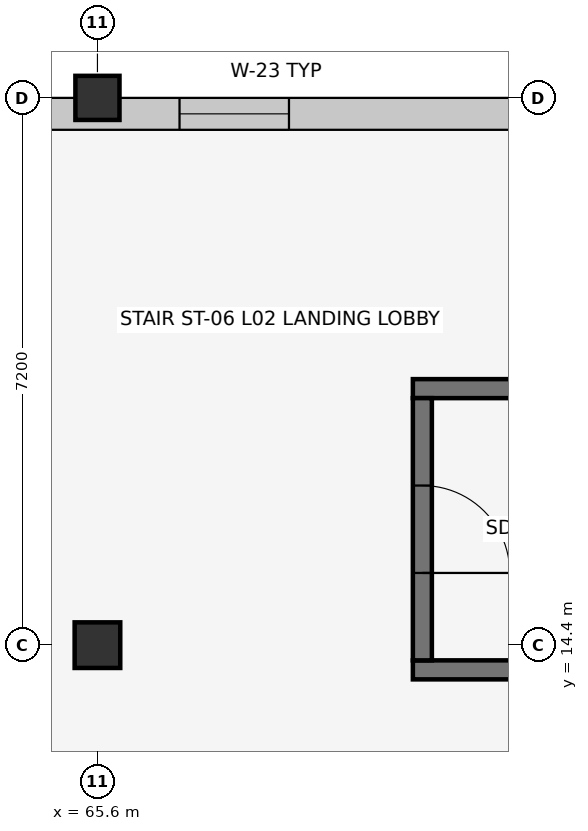
"""IFC4 building model, lengths in metres.
Left out: names, types, materials, properties, quantities, classifications, styles, units other than length and angle.
Written with IfcOpenShell. Run it as: python <this file> out.ifc"""

import sys

from ifc_helpers import new_model, si_unit, direction, frame, frame_2d, origin, origin_2d, place, context, subcontext, project, spatial, rectangle, extrude, element, fill, save


model = new_model("IFC4")
c1 = context("Model", 3, precision=1e-05, world=origin(), true_north=direction((0.0, 1.0)))
c2 = subcontext(c1, "Body", "Model", "MODEL_VIEW")
j1 = project(units=[si_unit("LENGTHUNIT", "METRE"), si_unit("PLANEANGLEUNIT", "RADIAN")], contexts=[c1])
p1 = place(None, origin())
s1 = spatial("IfcSite", under=j1, at=p1, CompositionType="ELEMENT")
p2 = place(p1, origin())
s2 = spatial("IfcBuilding", under=s1, at=p2, CompositionType="ELEMENT")
p3 = place(p2, frame((0.0, 0.0, 9.6)))
s3 = spatial("IfcBuildingStorey", under=s2, at=p3, CompositionType="ELEMENT", Elevation=9.6)
p4 = place(p3, frame((65.6, 14.4, 0.0), z_axis=(0.0, 0.0, 1.0), x_axis=(1.0, 0.0, 0.0)))
e1 = element("IfcColumn", 1, at=p4, inside=s3, PredefinedType="COLUMN", context=c2, shape_type="SweptSolid", body=[
    extrude(rectangle(XDim=0.6, YDim=0.6, at=origin_2d()), origin(), (0.0, 0.0, 1.0), 4.2),
])
p5 = place(p3, frame((65.6, 21.6, 0.0), z_axis=(0.0, 0.0, 1.0), x_axis=(1.0, 0.0, 0.0)))
e2 = element("IfcColumn", 2, at=p5, inside=s3, PredefinedType="COLUMN", context=c2, shape_type="SweptSolid", body=[
    extrude(rectangle(XDim=0.58, YDim=0.58, at=origin_2d()), origin(), (0.0, 0.0, 1.0), 4.2),
])
p6 = place(p3, frame((58.4, 21.39, 0.0), z_axis=(0.0, 0.0, 1.0), x_axis=(1.0, 0.0, 0.0)))
e3 = element("IfcWall", 3, at=p6, inside=s3, PredefinedType="SOLIDWALL", context=c2, shape_type="SweptSolid", body=[
    extrude(rectangle(XDim=43.2, YDim=0.42, at=frame_2d((21.6, 0.0))), origin(), (0.0, 0.0, 1.0), 3.255),
])
p7 = place(p6, frame((1.18, 0.0, 0.9)))
e4 = element("IfcOpeningElement", 4, at=p7, cuts=e3, PredefinedType="OPENING", context=c2, shape_type="SweptSolid", body=[
    extrude(rectangle(XDim=1.24, YDim=1.75, at=frame_2d((0.62, 0.875))), frame((0.0, 0.222, 0.0), z_axis=(0.0, -1.0, 0.0), x_axis=(1.0, 0.0, 0.0)), (0.0, 0.0, 1.0), 0.444),
])
p8 = place(p6, frame((4.73, 0.0, 0.9)))
e5 = element("IfcOpeningElement", 5, at=p8, cuts=e3, PredefinedType="OPENING", context=c2, shape_type="SweptSolid", body=[
    extrude(rectangle(XDim=1.34, YDim=1.75, at=frame_2d((0.67, 0.875))), frame((0.0, 0.222, 0.0), z_axis=(0.0, -1.0, 0.0), x_axis=(1.0, 0.0, 0.0)), (0.0, 0.0, 1.0), 0.444),
])
p9 = place(p6, frame((8.28, 0.0, 0.9)))
e6 = element("IfcOpeningElement", 6, at=p9, cuts=e3, PredefinedType="OPENING", context=c2, shape_type="SweptSolid", body=[
    extrude(rectangle(XDim=1.44, YDim=1.75, at=frame_2d((0.72, 0.875))), frame((0.0, 0.222, 0.0), z_axis=(0.0, -1.0, 0.0), x_axis=(1.0, 0.0, 0.0)), (0.0, 0.0, 1.0), 0.444),
])
p10 = place(p6, frame((15.75, 0.0, 0.9)))
e7 = element("IfcOpeningElement", 7, at=p10, cuts=e3, PredefinedType="OPENING", context=c2, shape_type="SweptSolid", body=[
    extrude(rectangle(XDim=0.9, YDim=1.35, at=frame_2d((0.45, 0.675))), frame((0.0, 0.222, 0.0), z_axis=(0.0, -1.0, 0.0), x_axis=(1.0, 0.0, 0.0)), (0.0, 0.0, 1.0), 0.444),
])
p11 = place(p6, frame((19.3, 0.0, 0.9)))
e8 = element("IfcOpeningElement", 8, at=p11, cuts=e3, PredefinedType="OPENING", context=c2, shape_type="SweptSolid", body=[
    extrude(rectangle(XDim=1.0, YDim=1.35, at=frame_2d((0.5, 0.675))), frame((0.0, 0.222, 0.0), z_axis=(0.0, -1.0, 0.0), x_axis=(1.0, 0.0, 0.0)), (0.0, 0.0, 1.0), 0.444),
])
p12 = place(p6, frame((22.85, 0.0, 0.9)))
e9 = element("IfcOpeningElement", 9, at=p12, cuts=e3, PredefinedType="OPENING", context=c2, shape_type="SweptSolid", body=[
    extrude(rectangle(XDim=1.1, YDim=1.35, at=frame_2d((0.55, 0.675))), frame((0.0, 0.222, 0.0), z_axis=(0.0, -1.0, 0.0), x_axis=(1.0, 0.0, 0.0)), (0.0, 0.0, 1.0), 0.444),
])
p13 = place(p6, frame((29.95, 0.0, 0.9)))
e10 = element("IfcOpeningElement", 10, at=p13, cuts=e3, PredefinedType="OPENING", context=c2, shape_type="SweptSolid", body=[
    extrude(rectangle(XDim=1.3, YDim=1.35, at=frame_2d((0.65, 0.675))), frame((0.0, 0.222, 0.0), z_axis=(0.0, -1.0, 0.0), x_axis=(1.0, 0.0, 0.0)), (0.0, 0.0, 1.0), 0.444),
])
p14 = place(p6, frame((33.5, 0.0, 0.9)))
e11 = element("IfcOpeningElement", 11, at=p14, cuts=e3, PredefinedType="OPENING", context=c2, shape_type="SweptSolid", body=[
    extrude(rectangle(XDim=1.4, YDim=1.35, at=frame_2d((0.7, 0.675))), frame((0.0, 0.222, 0.0), z_axis=(0.0, -1.0, 0.0), x_axis=(1.0, 0.0, 0.0)), (0.0, 0.0, 1.0), 0.444),
])
p15 = place(p6, frame((37.325, 0.0, 0.9)))
e12 = element("IfcOpeningElement", 12, at=p15, cuts=e3, PredefinedType="OPENING", context=c2, shape_type="SweptSolid", body=[
    extrude(rectangle(XDim=0.95, YDim=1.45, at=frame_2d((0.475, 0.725))), frame((0.0, 0.222, 0.0), z_axis=(0.0, -1.0, 0.0), x_axis=(1.0, 0.0, 0.0)), (0.0, 0.0, 1.0), 0.444),
])
p16 = place(p6, frame((40.875, 0.0, 0.9)))
e13 = element("IfcOpeningElement", 13, at=p16, cuts=e3, PredefinedType="OPENING", context=c2, shape_type="SweptSolid", body=[
    extrude(rectangle(XDim=1.05, YDim=1.45, at=frame_2d((0.525, 0.725))), frame((0.0, 0.222, 0.0), z_axis=(0.0, -1.0, 0.0), x_axis=(1.0, 0.0, 0.0)), (0.0, 0.0, 1.0), 0.444),
])
for number, where, z_axis, x_axis in (
    (14, (69.75, 14.075, 0.0), (0.0, 0.0, 1.0), (1.0, 0.0, 0.0)),
    (15, (78.65, 17.775, 0.0), (0.0, 0.0, 1.0), (-1.0, 0.0, 0.0)),
):
    element("IfcWall", number, at=place(p3, frame(where, z_axis=z_axis, x_axis=x_axis)), inside=s3, PredefinedType="SHEAR", context=c2, shape_type="SweptSolid", body=[
        extrude(rectangle(XDim=8.9, YDim=0.25, at=frame_2d((4.45, 0.0))), origin(), (0.0, 0.0, 1.0), 3.96),
    ])
p17 = place(p3, frame((69.875, 17.65, 0.0), z_axis=(0.0, 0.0, 1.0), x_axis=(0.0, -1.0, 0.0)))
e16 = element("IfcWall", 16, at=p17, inside=s3, PredefinedType="SHEAR", context=c2, shape_type="SweptSolid", body=[
    extrude(rectangle(XDim=3.45, YDim=0.25, at=frame_2d((1.725, 0.0))), origin(), (0.0, 0.0, 1.0), 3.96),
])
p18 = place(p17, frame((1.15, 0.0, 0.0)))
e17 = element("IfcOpeningElement", 17, at=p18, cuts=e16, PredefinedType="OPENING", context=c2, shape_type="SweptSolid", body=[
    extrude(rectangle(XDim=1.15, YDim=2.15, at=frame_2d((0.575, 1.075))), frame((0.0, 0.137, 0.0), z_axis=(0.0, -1.0, 0.0), x_axis=(1.0, 0.0, 0.0)), (0.0, 0.0, 1.0), 0.274),
])
p19 = place(p9, origin())
e18 = element("IfcWindow", 18, at=p19, inside=s3, PartitioningType="SINGLE_PANEL", PredefinedType="WINDOW", context=c2, shape_type="SweptSolid", body=[
    extrude(rectangle(XDim=1.44, YDim=1.75, at=frame_2d((0.72, 0.875))), frame((0.0, 0.03, 0.0), z_axis=(0.0, -1.0, 0.0), x_axis=(1.0, 0.0, 0.0)), (0.0, 0.0, 1.0), 0.06),
])
fill(e6, e18)
p20 = place(p18, origin())
e19 = element("IfcDoor", 19, at=p20, inside=s3, OperationType="SINGLE_SWING_RIGHT", PredefinedType="DOOR", context=c2, shape_type="SweptSolid", body=[
    extrude(rectangle(XDim=1.15, YDim=2.15, at=frame_2d((0.575, 1.075))), frame((0.0, 0.025, 0.0), z_axis=(0.0, -1.0, 0.0), x_axis=(1.0, 0.0, 0.0)), (0.0, 0.0, 1.0), 0.05),
])
fill(e17, e19)
save(model, sys.argv[1])
